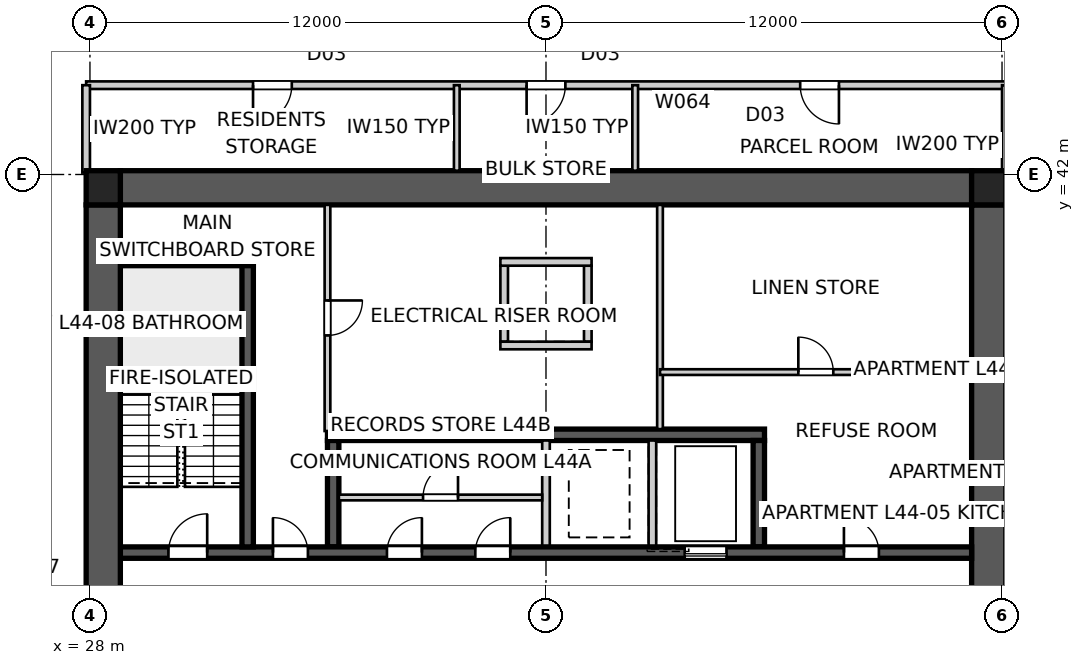
"""IFC4 building model, lengths in metres.
Left out: names, types, materials, properties, quantities, classifications, styles, units other than length and angle.
Written with IfcOpenShell. Run it as: python <this file> out.ifc"""

import sys

from ifc_helpers import new_model, si_unit, direction, frame, frame_2d, origin, origin_2d, place, context, subcontext, project, spatial, polyline, rectangle, outline, extrude, element, fill, save


model = new_model("IFC4")
c1 = context("Model", 3, precision=1e-05, world=origin(), true_north=direction((0.0, 1.0)))
c2 = subcontext(c1, "Body", "Model", "MODEL_VIEW")
j1 = project(units=[si_unit("LENGTHUNIT", "METRE"), si_unit("PLANEANGLEUNIT", "RADIAN")], contexts=[c1])
p1 = place(None, origin())
s1 = spatial("IfcSite", under=j1, at=p1, CompositionType="ELEMENT")
p2 = place(p1, origin())
s2 = spatial("IfcBuilding", under=s1, at=p2, CompositionType="ELEMENT")
p3 = place(p2, frame((0.0, 0.0, 160.8)))
s3 = spatial("IfcBuildingStorey", under=s2, at=p3, CompositionType="ELEMENT", Elevation=160.8)
p4 = place(p3, frame((28.8, 41.65, 0.0), z_axis=(0.0, 0.0, 1.0), x_axis=(1.0, 0.0, 0.0)))
e1 = element("IfcWall", 1, at=p4, inside=s3, PredefinedType="SHEAR", context=c2, shape_type="SweptSolid", body=[
    extrude(outline(polyline([(0.0, -0.45), (22.4, -0.45), (22.4, -0.025), (22.85, -0.025), (22.85, 0.025), (22.4, 0.025), (22.4, 0.45), (0.0, 0.45), (0.0, 0.025), (-0.45, 0.025), (-0.45, -0.025), (0.0, -0.025), (0.0, -0.45)])), origin(), (0.0, 0.0, 1.0), 3.4),
])
p5 = place(p3, frame((51.65, 18.8, 0.0), z_axis=(0.0, 0.0, 1.0), x_axis=(0.0, 1.0, 0.0)))
e2 = element("IfcWall", 2, at=p5, inside=s3, PredefinedType="SHEAR", context=c2, shape_type="SweptSolid", body=[
    extrude(outline(polyline([(0.0, -0.45), (22.4, -0.45), (22.4, -0.025), (22.85, -0.025), (22.85, 0.025), (22.4, 0.025), (22.4, 0.45), (0.0, 0.45), (0.0, 0.025), (-0.45, 0.025), (-0.45, -0.025), (0.0, -0.025), (0.0, -0.45)])), origin(), (0.0, 0.0, 1.0), 3.4),
])
p6 = place(p5, frame((11.14, 0.0, 0.0)))
e3 = element("IfcOpeningElement", 3, at=p6, cuts=e2, PredefinedType="OPENING", context=c2, shape_type="SweptSolid", body=[
    extrude(rectangle(XDim=1.02, YDim=2.4, at=frame_2d((0.51, 1.2))), frame((0.0, 0.46, 0.0), z_axis=(0.0, -1.0, 0.0), x_axis=(1.0, 0.0, 0.0)), (0.0, 0.0, 1.0), 0.92),
])
p7 = place(p3, frame((28.35, 41.2, 0.0), z_axis=(0.0, 0.0, 1.0), x_axis=(0.0, -1.0, 0.0)))
e4 = element("IfcWall", 4, at=p7, inside=s3, PredefinedType="SHEAR", context=c2, shape_type="SweptSolid", body=[
    extrude(outline(polyline([(0.0, -0.45), (22.4, -0.45), (22.4, -0.025), (22.85, -0.025), (22.85, 0.025), (22.4, 0.025), (22.4, 0.45), (0.0, 0.45), (0.0, 0.025), (-0.45, 0.025), (-0.45, -0.025), (0.0, -0.025), (0.0, -0.45)])), origin(), (0.0, 0.0, 1.0), 3.4),
])
p8 = place(p7, frame((11.14, 0.0, 0.0)))
e5 = element("IfcOpeningElement", 5, at=p8, cuts=e4, PredefinedType="OPENING", context=c2, shape_type="SweptSolid", body=[
    extrude(rectangle(XDim=1.02, YDim=2.4, at=frame_2d((0.51, 1.2))), frame((0.0, 0.46, 0.0), z_axis=(0.0, -1.0, 0.0), x_axis=(1.0, 0.0, 0.0)), (0.0, 0.0, 1.0), 0.92),
])
p9 = place(p3, frame((28.8, 32.05, 0.0), z_axis=(0.0, 0.0, 1.0), x_axis=(1.0, 0.0, 0.0)))
e6 = element("IfcWall", 6, at=p9, inside=s3, PredefinedType="SHEAR", context=c2, shape_type="SweptSolid", body=[
    extrude(rectangle(XDim=22.4, YDim=0.3, at=frame_2d((11.2, 0.0))), origin(), (0.0, 0.0, 1.0), 3.4),
])
p10 = place(p9, frame((19.04, 0.0, 0.0)))
e7 = element("IfcOpeningElement", 7, at=p10, cuts=e6, PredefinedType="OPENING", context=c2, shape_type="SweptSolid", body=[
    extrude(rectangle(XDim=0.92, YDim=2.1, at=frame_2d((0.46, 1.05))), frame((0.0, 0.16, 0.0), z_axis=(0.0, -1.0, 0.0), x_axis=(1.0, 0.0, 0.0)), (0.0, 0.0, 1.0), 0.32),
])
p11 = place(p9, frame((1.265, 0.0, 0.0)))
e8 = element("IfcOpeningElement", 8, at=p11, cuts=e6, PredefinedType="OPENING", context=c2, shape_type="SweptSolid", body=[
    extrude(rectangle(XDim=1.02, YDim=2.1, at=frame_2d((0.51, 1.05))), frame((0.0, 0.16, 0.0), z_axis=(0.0, -1.0, 0.0), x_axis=(1.0, 0.0, 0.0)), (0.0, 0.0, 1.0), 0.32),
])
p12 = place(p9, frame((4.015, 0.0, 0.0)))
e9 = element("IfcOpeningElement", 9, at=p12, cuts=e6, PredefinedType="OPENING", context=c2, shape_type="SweptSolid", body=[
    extrude(rectangle(XDim=0.92, YDim=2.1, at=frame_2d((0.46, 1.05))), frame((0.0, 0.16, 0.0), z_axis=(0.0, -1.0, 0.0), x_axis=(1.0, 0.0, 0.0)), (0.0, 0.0, 1.0), 0.32),
])
p13 = place(p9, frame((7.015, 0.0, 0.0)))
e10 = element("IfcOpeningElement", 10, at=p13, cuts=e6, PredefinedType="OPENING", context=c2, shape_type="SweptSolid", body=[
    extrude(rectangle(XDim=0.92, YDim=2.1, at=frame_2d((0.46, 1.05))), frame((0.0, 0.16, 0.0), z_axis=(0.0, -1.0, 0.0), x_axis=(1.0, 0.0, 0.0)), (0.0, 0.0, 1.0), 0.32),
])
p14 = place(p9, frame((9.34, 0.0, 0.0)))
e11 = element("IfcOpeningElement", 11, at=p14, cuts=e6, PredefinedType="OPENING", context=c2, shape_type="SweptSolid", body=[
    extrude(rectangle(XDim=0.92, YDim=2.1, at=frame_2d((0.46, 1.05))), frame((0.0, 0.16, 0.0), z_axis=(0.0, -1.0, 0.0), x_axis=(1.0, 0.0, 0.0)), (0.0, 0.0, 1.0), 0.32),
])
p15 = place(p9, frame((14.85, 0.0, 0.0)))
e12 = element("IfcOpeningElement", 12, at=p15, cuts=e6, PredefinedType="OPENING", context=c2, shape_type="SweptSolid", body=[
    extrude(rectangle(XDim=1.1, YDim=2.1, at=frame_2d((0.55, 1.05))), frame((0.0, 0.16, 0.0), z_axis=(0.0, -1.0, 0.0), x_axis=(1.0, 0.0, 0.0)), (0.0, 0.0, 1.0), 0.32),
])
p16 = place(p3, frame((34.25, 35.15, 0.0), z_axis=(0.0, 0.0, 1.0), x_axis=(1.0, 0.0, 0.0)))
e13 = element("IfcWall", 13, at=p16, inside=s3, PredefinedType="SHEAR", context=c2, shape_type="SweptSolid", body=[
    extrude(rectangle(XDim=11.5, YDim=0.3, at=frame_2d((5.75, 0.0))), origin(), (0.0, 0.0, 1.0), 3.4),
])
p17 = place(p3, frame((34.4, 32.2, 0.0), z_axis=(0.0, 0.0, 1.0), x_axis=(0.0, 1.0, 0.0)))
e14 = element("IfcWall", 14, at=p17, inside=s3, PredefinedType="SHEAR", context=c2, shape_type="SweptSolid", body=[
    extrude(rectangle(XDim=2.8, YDim=0.3, at=frame_2d((1.4, 0.0))), origin(), (0.0, 0.0, 1.0), 3.4),
])
for number, where, z_axis, x_axis in (
    (15, (40.0, 32.2, 0.0), (0.0, 0.0, 1.0), (0.0, 1.0, 0.0)),
    (16, (42.8, 32.2, 0.0), (0.0, 0.0, 1.0), (0.0, 1.0, 0.0)),
):
    element("IfcWall", number, at=place(p3, frame(where, z_axis=z_axis, x_axis=x_axis)), inside=s3, PredefinedType="SOLIDWALL", context=c2, shape_type="SweptSolid", body=[
        extrude(rectangle(XDim=2.8, YDim=0.2, at=frame_2d((1.4, 0.0))), origin(), (0.0, 0.0, 1.0), 3.4),
    ])
p18 = place(p3, frame((45.6, 32.2, 0.0), z_axis=(0.0, 0.0, 1.0), x_axis=(0.0, 1.0, 0.0)))
e17 = element("IfcWall", 17, at=p18, inside=s3, PredefinedType="SHEAR", context=c2, shape_type="SweptSolid", body=[
    extrude(rectangle(XDim=2.8, YDim=0.3, at=frame_2d((1.4, 0.0))), origin(), (0.0, 0.0, 1.0), 3.4),
])
p19 = place(p3, frame((32.15, 32.2, 0.0), z_axis=(0.0, 0.0, 1.0), x_axis=(0.0, 1.0, 0.0)))
e18 = element("IfcWall", 18, at=p19, inside=s3, PredefinedType="SHEAR", context=c2, shape_type="SweptSolid", body=[
    extrude(rectangle(XDim=7.7, YDim=0.3, at=frame_2d((3.85, 0.0))), origin(), (0.0, 0.0, 1.0), 3.4),
])
p20 = place(p3, frame((28.8, 39.75, 0.0), z_axis=(0.0, 0.0, 1.0), x_axis=(1.0, 0.0, 0.0)))
e19 = element("IfcWall", 19, at=p20, inside=s3, PredefinedType="SHEAR", context=c2, shape_type="SweptSolid", body=[
    extrude(rectangle(XDim=3.5, YDim=0.3, at=frame_2d((1.75, 0.0))), origin(), (0.0, 0.0, 1.0), 3.4),
])
for number, where, z_axis, x_axis in (
    (20, (38.9, 37.6, 0.0), (0.0, 0.0, 1.0), (0.0, 1.0, 0.0)),
    (21, (41.1, 37.6, 0.0), (0.0, 0.0, 1.0), (0.0, 1.0, 0.0)),
):
    element("IfcWall", number, at=place(p3, frame(where, z_axis=z_axis, x_axis=x_axis)), inside=s3, PredefinedType="SOLIDWALL", context=c2, shape_type="SweptSolid", body=[
        extrude(rectangle(XDim=2.0, YDim=0.2, at=frame_2d((1.0, 0.0))), origin(), (0.0, 0.0, 1.0), 3.4),
    ])
for number, where, z_axis, x_axis in (
    (22, (38.8, 37.5, 0.0), (0.0, 0.0, 1.0), (1.0, 0.0, 0.0)),
    (23, (38.8, 39.7, 0.0), (0.0, 0.0, 1.0), (1.0, 0.0, 0.0)),
):
    element("IfcWall", number, at=place(p3, frame(where, z_axis=z_axis, x_axis=x_axis)), inside=s3, PredefinedType="SOLIDWALL", context=c2, shape_type="SweptSolid", body=[
        extrude(rectangle(XDim=2.4, YDim=0.2, at=frame_2d((1.2, 0.0))), origin(), (0.0, 0.0, 1.0), 3.4),
    ])
for number, where, z_axis, x_axis in (
    (24, (51.65, 41.65, 0.0), (0.0, 0.0, 1.0), (1.0, 0.0, 0.0)),
    (25, (28.35, 41.65, 0.0), (0.0, 0.0, 1.0), (1.0, 0.0, 0.0)),
):
    element("IfcColumn", number, at=place(p3, frame(where, z_axis=z_axis, x_axis=x_axis)), inside=s3, PredefinedType="COLUMN", context=c2, shape_type="SweptSolid", body=[
        extrude(rectangle(XDim=0.9, YDim=0.9, at=origin_2d()), origin(), (0.0, 0.0, 1.0), 3.4),
    ])
p21 = place(p3, frame((34.25, 41.2, 0.0), z_axis=(0.0, 0.0, 1.0), x_axis=(0.0, -1.0, 0.0)))
e26 = element("IfcWall", 26, at=p21, inside=s3, PredefinedType="SOLIDWALL", context=c2, shape_type="SweptSolid", body=[
    extrude(rectangle(XDim=5.95, YDim=0.15, at=frame_2d((2.975, 0.0))), origin(), (0.0, 0.0, 1.0), 3.25),
])
p22 = place(p21, frame((2.515, 0.0, 0.0)))
e27 = element("IfcOpeningElement", 27, at=p22, cuts=e26, PredefinedType="OPENING", context=c2, shape_type="SweptSolid", body=[
    extrude(rectangle(XDim=0.92, YDim=2.1, at=frame_2d((0.46, 1.05))), frame((0.0, 0.085, 0.0), z_axis=(0.0, -1.0, 0.0), x_axis=(1.0, 0.0, 0.0)), (0.0, 0.0, 1.0), 0.17),
])
p23 = place(p3, frame((43.0, 41.2, 0.0), z_axis=(0.0, 0.0, 1.0), x_axis=(0.0, -1.0, 0.0)))
e28 = element("IfcWall", 28, at=p23, inside=s3, PredefinedType="SOLIDWALL", context=c2, shape_type="SweptSolid", body=[
    extrude(rectangle(XDim=5.9, YDim=0.15, at=frame_2d((2.95, 0.0))), origin(), (0.0, 0.0, 1.0), 3.25),
])
p24 = place(p3, frame((43.0, 36.8, 0.0), z_axis=(0.0, 0.0, 1.0), x_axis=(1.0, 0.0, 0.0)))
e29 = element("IfcWall", 29, at=p24, inside=s3, PredefinedType="SOLIDWALL", context=c2, shape_type="SweptSolid", body=[
    extrude(rectangle(XDim=8.2, YDim=0.15, at=frame_2d((4.1, 0.0))), origin(), (0.0, 0.0, 1.0), 3.25),
])
p25 = place(p24, frame((3.64, 0.0, 0.0)))
e30 = element("IfcOpeningElement", 30, at=p25, cuts=e29, PredefinedType="OPENING", context=c2, shape_type="SweptSolid", body=[
    extrude(rectangle(XDim=0.92, YDim=2.1, at=frame_2d((0.46, 1.05))), frame((0.0, 0.085, 0.0), z_axis=(0.0, -1.0, 0.0), x_axis=(1.0, 0.0, 0.0)), (0.0, 0.0, 1.0), 0.17),
])
p26 = place(p3, frame((52.1, 44.35, 0.0), z_axis=(0.0, 0.0, 1.0), x_axis=(-1.0, 0.0, 0.0)))
e31 = element("IfcWall", 31, at=p26, inside=s3, PredefinedType="PARTITIONING", context=c2, shape_type="SweptSolid", body=[
    extrude(rectangle(XDim=24.2, YDim=0.2, at=frame_2d((12.1, 0.0))), origin(), (0.0, 0.0, 1.0), 3.25),
])
p27 = place(p26, frame((18.789, 0.0, 0.0)))
e32 = element("IfcOpeningElement", 32, at=p27, cuts=e31, PredefinedType="OPENING", context=c2, shape_type="SweptSolid", body=[
    extrude(rectangle(XDim=1.02, YDim=2.1, at=frame_2d((0.51, 1.05))), frame((0.0, 0.11, 0.0), z_axis=(0.0, -1.0, 0.0), x_axis=(1.0, 0.0, 0.0)), (0.0, 0.0, 1.0), 0.22),
])
p28 = place(p26, frame((4.391, 0.0, 0.0)))
e33 = element("IfcOpeningElement", 33, at=p28, cuts=e31, PredefinedType="OPENING", context=c2, shape_type="SweptSolid", body=[
    extrude(rectangle(XDim=1.02, YDim=2.1, at=frame_2d((0.51, 1.05))), frame((0.0, 0.11, 0.0), z_axis=(0.0, -1.0, 0.0), x_axis=(1.0, 0.0, 0.0)), (0.0, 0.0, 1.0), 0.22),
])
p29 = place(p26, frame((11.59, 0.0, 0.0)))
e34 = element("IfcOpeningElement", 34, at=p29, cuts=e31, PredefinedType="OPENING", context=c2, shape_type="SweptSolid", body=[
    extrude(rectangle(XDim=1.02, YDim=2.1, at=frame_2d((0.51, 1.05))), frame((0.0, 0.11, 0.0), z_axis=(0.0, -1.0, 0.0), x_axis=(1.0, 0.0, 0.0)), (0.0, 0.0, 1.0), 0.22),
])
p30 = place(p3, frame((27.9, 44.35, 0.0), z_axis=(0.0, 0.0, 1.0), x_axis=(0.0, -1.0, 0.0)))
e35 = element("IfcWall", 35, at=p30, inside=s3, PredefinedType="PARTITIONING", context=c2, shape_type="SweptSolid", body=[
    extrude(rectangle(XDim=2.3, YDim=0.2, at=frame_2d((1.15, 0.0))), origin(), (0.0, 0.0, 1.0), 3.25),
])
p31 = place(p3, frame((52.1, 41.18, 0.0), z_axis=(0.0, 0.0, 1.0), x_axis=(0.0, 1.0, 0.0)))
e36 = element("IfcWall", 36, at=p31, inside=s3, PredefinedType="PARTITIONING", context=c2, shape_type="SweptSolid", body=[
    extrude(rectangle(XDim=3.17, YDim=0.2, at=frame_2d((1.585, 0.0))), origin(), (0.0, 0.0, 1.0), 3.25),
])
for number, where, z_axis, x_axis in (
    (37, (37.653, 42.1, 0.0), (0.0, 0.0, 1.0), (0.0, 1.0, 0.0)),
    (38, (42.347, 42.1, 0.0), (0.0, 0.0, 1.0), (0.0, 1.0, 0.0)),
):
    element("IfcWall", number, at=place(p3, frame(where, z_axis=z_axis, x_axis=x_axis)), inside=s3, PredefinedType="SOLIDWALL", context=c2, shape_type="SweptSolid", body=[
        extrude(rectangle(XDim=2.25, YDim=0.15, at=frame_2d((1.125, 0.0))), origin(), (0.0, 0.0, 1.0), 3.25),
    ])
p32 = place(p3, frame((34.55, 33.5, 0.0), z_axis=(0.0, 0.0, 1.0), x_axis=(1.0, 0.0, 0.0)))
e39 = element("IfcWall", 39, at=p32, inside=s3, PredefinedType="SOLIDWALL", context=c2, shape_type="SweptSolid", body=[
    extrude(rectangle(XDim=5.35, YDim=0.15, at=frame_2d((2.675, 0.0))), origin(), (0.0, 0.0, 1.0), 3.25),
])
p33 = place(p32, frame((2.215, 0.0, 0.0)))
e40 = element("IfcOpeningElement", 40, at=p33, cuts=e39, PredefinedType="OPENING", context=c2, shape_type="SweptSolid", body=[
    extrude(rectangle(XDim=0.92, YDim=2.1, at=frame_2d((0.46, 1.05))), frame((0.0, 0.085, 0.0), z_axis=(0.0, -1.0, 0.0), x_axis=(1.0, 0.0, 0.0)), (0.0, 0.0, 1.0), 0.17),
])
p34 = place(p10, origin())
e41 = element("IfcDoor", 41, at=p34, inside=s3, OperationType="SINGLE_SWING_LEFT", PredefinedType="DOOR", context=c2, shape_type="SweptSolid", body=[
    extrude(rectangle(XDim=0.92, YDim=2.1, at=frame_2d((0.46, 1.05))), frame((0.0, 0.025, 0.0), z_axis=(0.0, -1.0, 0.0), x_axis=(1.0, 0.0, 0.0)), (0.0, 0.0, 1.0), 0.05),
])
fill(e7, e41)
p35 = place(p11, origin())
e42 = element("IfcDoor", 42, at=p35, inside=s3, OperationType="SINGLE_SWING_RIGHT", PredefinedType="DOOR", context=c2, shape_type="SweptSolid", body=[
    extrude(rectangle(XDim=1.02, YDim=2.1, at=frame_2d((0.51, 1.05))), frame((0.0, 0.025, 0.0), z_axis=(0.0, -1.0, 0.0), x_axis=(1.0, 0.0, 0.0)), (0.0, 0.0, 1.0), 0.05),
])
fill(e8, e42)
p36 = place(p12, origin())
e43 = element("IfcDoor", 43, at=p36, inside=s3, OperationType="SINGLE_SWING_LEFT", PredefinedType="DOOR", context=c2, shape_type="SweptSolid", body=[
    extrude(rectangle(XDim=0.92, YDim=2.1, at=frame_2d((0.46, 1.05))), frame((0.0, 0.025, 0.0), z_axis=(0.0, -1.0, 0.0), x_axis=(1.0, 0.0, 0.0)), (0.0, 0.0, 1.0), 0.05),
])
fill(e9, e43)
p37 = place(p27, origin())
e44 = element("IfcDoor", 44, at=p37, inside=s3, OperationType="SINGLE_SWING_RIGHT", PredefinedType="DOOR", context=c2, shape_type="SweptSolid", body=[
    extrude(rectangle(XDim=1.02, YDim=2.1, at=frame_2d((0.51, 1.05))), frame((0.0, 0.025, 0.0), z_axis=(0.0, -1.0, 0.0), x_axis=(1.0, 0.0, 0.0)), (0.0, 0.0, 1.0), 0.05),
])
fill(e32, e44)
p38 = place(p28, origin())
e45 = element("IfcDoor", 45, at=p38, inside=s3, OperationType="SINGLE_SWING_LEFT", PredefinedType="DOOR", context=c2, shape_type="SweptSolid", body=[
    extrude(rectangle(XDim=1.02, YDim=2.1, at=frame_2d((0.51, 1.05))), frame((0.0, 0.025, 0.0), z_axis=(0.0, -1.0, 0.0), x_axis=(1.0, 0.0, 0.0)), (0.0, 0.0, 1.0), 0.05),
])
fill(e33, e45)
p39 = place(p29, origin())
e46 = element("IfcDoor", 46, at=p39, inside=s3, OperationType="SINGLE_SWING_RIGHT", PredefinedType="DOOR", context=c2, shape_type="SweptSolid", body=[
    extrude(rectangle(XDim=1.02, YDim=2.1, at=frame_2d((0.51, 1.05))), frame((0.0, 0.025, 0.0), z_axis=(0.0, -1.0, 0.0), x_axis=(1.0, 0.0, 0.0)), (0.0, 0.0, 1.0), 0.05),
])
fill(e34, e46)
p40 = place(p25, origin())
e47 = element("IfcDoor", 47, at=p40, inside=s3, OperationType="SINGLE_SWING_LEFT", PredefinedType="DOOR", context=c2, shape_type="SweptSolid", body=[
    extrude(rectangle(XDim=0.92, YDim=2.1, at=frame_2d((0.46, 1.05))), frame((0.0, 0.025, 0.0), z_axis=(0.0, -1.0, 0.0), x_axis=(1.0, 0.0, 0.0)), (0.0, 0.0, 1.0), 0.05),
])
fill(e30, e47)
p41 = place(p22, origin())
e48 = element("IfcDoor", 48, at=p41, inside=s3, OperationType="SINGLE_SWING_LEFT", PredefinedType="DOOR", context=c2, shape_type="SweptSolid", body=[
    extrude(rectangle(XDim=0.92, YDim=2.1, at=frame_2d((0.46, 1.05))), frame((0.0, 0.025, 0.0), z_axis=(0.0, -1.0, 0.0), x_axis=(1.0, 0.0, 0.0)), (0.0, 0.0, 1.0), 0.05),
])
fill(e27, e48)
p42 = place(p13, origin())
e49 = element("IfcDoor", 49, at=p42, inside=s3, OperationType="SINGLE_SWING_RIGHT", PredefinedType="DOOR", context=c2, shape_type="SweptSolid", body=[
    extrude(rectangle(XDim=0.92, YDim=2.1, at=frame_2d((0.46, 1.05))), frame((0.0, 0.025, 0.0), z_axis=(0.0, -1.0, 0.0), x_axis=(1.0, 0.0, 0.0)), (0.0, 0.0, 1.0), 0.05),
])
fill(e10, e49)
p43 = place(p14, origin())
e50 = element("IfcDoor", 50, at=p43, inside=s3, OperationType="SINGLE_SWING_RIGHT", PredefinedType="DOOR", context=c2, shape_type="SweptSolid", body=[
    extrude(rectangle(XDim=0.92, YDim=2.1, at=frame_2d((0.46, 1.05))), frame((0.0, 0.025, 0.0), z_axis=(0.0, -1.0, 0.0), x_axis=(1.0, 0.0, 0.0)), (0.0, 0.0, 1.0), 0.05),
])
fill(e11, e50)
p44 = place(p33, origin())
e51 = element("IfcDoor", 51, at=p44, inside=s3, OperationType="SINGLE_SWING_RIGHT", PredefinedType="DOOR", context=c2, shape_type="SweptSolid", body=[
    extrude(rectangle(XDim=0.92, YDim=2.1, at=frame_2d((0.46, 1.05))), frame((0.0, 0.025, 0.0), z_axis=(0.0, -1.0, 0.0), x_axis=(1.0, 0.0, 0.0)), (0.0, 0.0, 1.0), 0.05),
])
fill(e40, e51)
p45 = place(p15, origin())
e52 = element("IfcDoor", 52, at=p45, inside=s3, OperationType="SLIDING_TO_LEFT", PredefinedType="DOOR", context=c2, shape_type="SweptSolid", body=[
    extrude(rectangle(XDim=1.1, YDim=2.1, at=frame_2d((0.55, 1.05))), frame((0.0, 0.025, 0.0), z_axis=(0.0, -1.0, 0.0), x_axis=(1.0, 0.0, 0.0)), (0.0, 0.0, 1.0), 0.05),
])
fill(e12, e52)
save(model, sys.argv[1])
